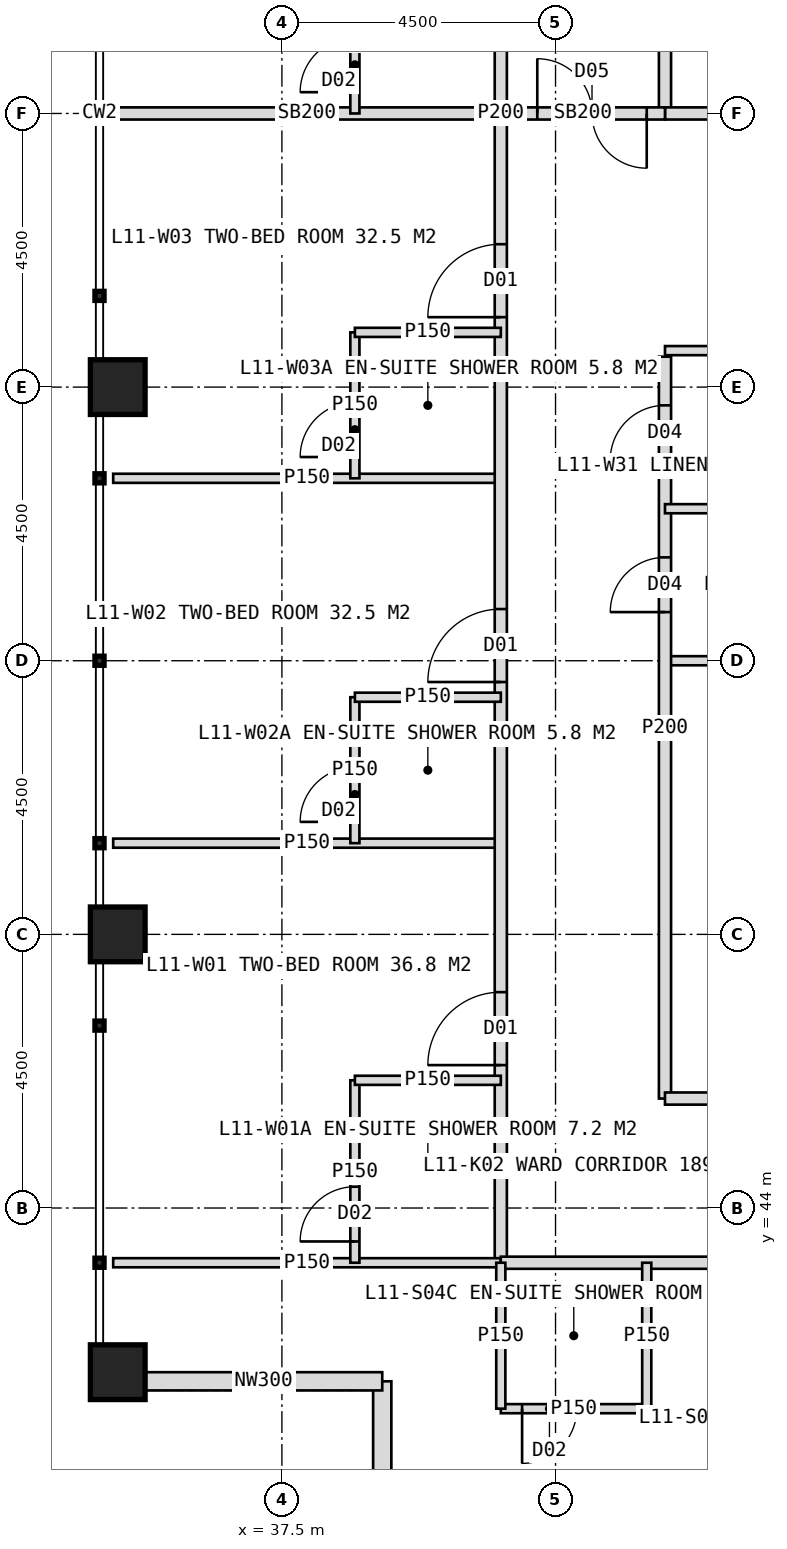
"""IFC4 building model, lengths in metres.
Left out: names, types, materials, properties, quantities, classifications, styles, units other than length and angle.
Written with IfcOpenShell. Run it as: python <this file> out.ifc"""

import sys

from ifc_helpers import new_model, si_unit, direction, frame, frame_2d, origin, origin_2d, place, context, subcontext, project, spatial, rectangle, hollow_rectangle, extrude, element, fill, save


model = new_model("IFC4")
c1 = context("Model", 3, precision=1e-05, world=origin(), true_north=direction((0.0, 1.0)))
c2 = subcontext(c1, "Body", "Model", "MODEL_VIEW")
j1 = project(units=[si_unit("LENGTHUNIT", "METRE"), si_unit("PLANEANGLEUNIT", "RADIAN")], contexts=[c1])
p1 = place(None, origin())
s1 = spatial("IfcSite", under=j1, at=p1, CompositionType="ELEMENT")
p2 = place(p1, origin())
s2 = spatial("IfcBuilding", under=s1, at=p2, CompositionType="ELEMENT")
p3 = place(p2, frame((0.0, 0.0, 51.0)))
s3 = spatial("IfcBuildingStorey", under=s2, at=p3, CompositionType="ELEMENT", Elevation=51.0)
for number, where, z_axis, x_axis in (
    (1, (34.8, 41.3, 0.0), (0.0, 0.0, 1.0), (1.0, 0.0, 0.0)),
    (2, (34.8, 48.5, 0.0), (0.0, 0.0, 1.0), (1.0, 0.0, 0.0)),
    (3, (34.8, 57.5, 0.0), (0.0, 0.0, 1.0), (1.0, 0.0, 0.0)),
):
    element("IfcColumn", number, at=place(p3, frame(where, z_axis=z_axis, x_axis=x_axis)), inside=s3, PredefinedType="COLUMN", context=c2, shape_type="SweptSolid", body=[
        extrude(hollow_rectangle(XDim=0.9, YDim=0.9, WallThickness=0.08, at=origin_2d()), origin(), (0.0, 0.0, 1.0), 4.0),
    ])
for number, where, z_axis, x_axis in (
    (4, (39.15, 37.25, 0.0), (0.0, 0.0, 1.0), (0.0, 1.0, 0.0)),
    (5, (39.15, 41.15, 0.0), (0.0, 0.0, 1.0), (-1.0, 0.0, 0.0)),
):
    element("IfcWall", number, at=place(p3, frame(where, z_axis=z_axis, x_axis=x_axis)), inside=s3, PredefinedType="ELEMENTEDWALL", context=c2, shape_type="SweptSolid", body=[
        extrude(rectangle(XDim=3.9, YDim=0.3, at=frame_2d((1.95, 0.0))), origin(), (0.0, 0.0, 1.0), 2.95),
    ])
for number, where, z_axis, x_axis in (
    (6, (41.1, 50.0, 0.0), (0.0, 0.0, 1.0), (-1.0, 0.0, 0.0)),
    (7, (41.1, 56.0, 0.0), (0.0, 0.0, 1.0), (-1.0, 0.0, 0.0)),
):
    element("IfcWall", number, at=place(p3, frame(where, z_axis=z_axis, x_axis=x_axis)), inside=s3, PredefinedType="PARTITIONING", context=c2, shape_type="SweptSolid", body=[
        extrude(rectangle(XDim=6.375, YDim=0.15, at=frame_2d((3.188, 0.0))), origin(), (0.0, 0.0, 1.0), 3.75),
    ])
p4 = place(p3, frame((41.1, 62.0, 0.0), z_axis=(0.0, 0.0, 1.0), x_axis=(-1.0, 0.0, 0.0)))
e8 = element("IfcWall", 8, at=p4, inside=s3, PredefinedType="SOLIDWALL", context=c2, shape_type="SweptSolid", body=[
    extrude(rectangle(XDim=6.375, YDim=0.2, at=frame_2d((3.188, 0.0))), origin(), (0.0, 0.0, 1.0), 2.75),
])
p5 = place(p3, frame((41.1, 43.1, 0.0), z_axis=(0.0, 0.0, 1.0), x_axis=(0.0, 1.0, 0.0)))
e9 = element("IfcWall", 9, at=p5, inside=s3, PredefinedType="PARTITIONING", context=c2, shape_type="SweptSolid", body=[
    extrude(rectangle(XDim=37.8, YDim=0.2, at=frame_2d((18.9, 0.0))), origin(), (0.0, 0.0, 1.0), 3.75),
])
p6 = place(p5, frame((3.25, 0.0, 0.0)))
e10 = element("IfcOpeningElement", 10, at=p6, cuts=e9, PredefinedType="OPENING", context=c2, shape_type="SweptSolid", body=[
    extrude(rectangle(XDim=1.2, YDim=2.2, at=frame_2d((0.6, 1.1))), frame((0.0, 0.11, 0.0), z_axis=(0.0, -1.0, 0.0), x_axis=(1.0, 0.0, 0.0)), (0.0, 0.0, 1.0), 0.22),
])
p7 = place(p5, frame((9.55, 0.0, 0.0)))
e11 = element("IfcOpeningElement", 11, at=p7, cuts=e9, PredefinedType="OPENING", context=c2, shape_type="SweptSolid", body=[
    extrude(rectangle(XDim=1.2, YDim=2.2, at=frame_2d((0.6, 1.1))), frame((0.0, 0.11, 0.0), z_axis=(0.0, -1.0, 0.0), x_axis=(1.0, 0.0, 0.0)), (0.0, 0.0, 1.0), 0.22),
])
p8 = place(p5, frame((15.55, 0.0, 0.0)))
e12 = element("IfcOpeningElement", 12, at=p8, cuts=e9, PredefinedType="OPENING", context=c2, shape_type="SweptSolid", body=[
    extrude(rectangle(XDim=1.2, YDim=2.2, at=frame_2d((0.6, 1.1))), frame((0.0, 0.11, 0.0), z_axis=(0.0, -1.0, 0.0), x_axis=(1.0, 0.0, 0.0)), (0.0, 0.0, 1.0), 0.22),
])
p9 = place(p5, frame((21.55, 0.0, 0.0)))
e13 = element("IfcOpeningElement", 13, at=p9, cuts=e9, PredefinedType="OPENING", context=c2, shape_type="SweptSolid", body=[
    extrude(rectangle(XDim=1.2, YDim=2.2, at=frame_2d((0.6, 1.1))), frame((0.0, 0.11, 0.0), z_axis=(0.0, -1.0, 0.0), x_axis=(1.0, 0.0, 0.0)), (0.0, 0.0, 1.0), 0.22),
])
p10 = place(p5, frame((27.55, 0.0, 0.0)))
e14 = element("IfcOpeningElement", 14, at=p10, cuts=e9, PredefinedType="OPENING", context=c2, shape_type="SweptSolid", body=[
    extrude(rectangle(XDim=1.2, YDim=2.2, at=frame_2d((0.6, 1.1))), frame((0.0, 0.11, 0.0), z_axis=(0.0, -1.0, 0.0), x_axis=(1.0, 0.0, 0.0)), (0.0, 0.0, 1.0), 0.22),
])
p11 = place(p3, frame((41.1, 43.1, 0.0), z_axis=(0.0, 0.0, 1.0), x_axis=(-1.0, 0.0, 0.0)))
e15 = element("IfcWall", 15, at=p11, inside=s3, PredefinedType="PARTITIONING", context=c2, shape_type="SweptSolid", body=[
    extrude(rectangle(XDim=6.375, YDim=0.15, at=frame_2d((3.188, 0.0))), origin(), (0.0, 0.0, 1.0), 3.75),
])
p12 = place(p3, frame((38.7, 43.1, 0.0), z_axis=(0.0, 0.0, 1.0), x_axis=(0.0, 1.0, 0.0)))
e16 = element("IfcWall", 16, at=p12, inside=s3, PredefinedType="PARTITIONING", context=c2, shape_type="SweptSolid", body=[
    extrude(rectangle(XDim=3.0, YDim=0.15, at=frame_2d((1.5, 0.0))), origin(), (0.0, 0.0, 1.0), 3.75),
])
p13 = place(p12, frame((0.35, 0.0, 0.0)))
e17 = element("IfcOpeningElement", 17, at=p13, cuts=e16, PredefinedType="OPENING", context=c2, shape_type="SweptSolid", body=[
    extrude(rectangle(XDim=0.9, YDim=2.1, at=frame_2d((0.45, 1.05))), frame((0.0, 0.085, 0.0), z_axis=(0.0, -1.0, 0.0), x_axis=(1.0, 0.0, 0.0)), (0.0, 0.0, 1.0), 0.17),
])
p14 = place(p3, frame((41.1, 46.1, 0.0), z_axis=(0.0, 0.0, 1.0), x_axis=(-1.0, 0.0, 0.0)))
e18 = element("IfcWall", 18, at=p14, inside=s3, PredefinedType="PARTITIONING", context=c2, shape_type="SweptSolid", body=[
    extrude(rectangle(XDim=2.4, YDim=0.15, at=frame_2d((1.2, 0.0))), origin(), (0.0, 0.0, 1.0), 3.75),
])
p15 = place(p3, frame((38.7, 50.0, 0.0), z_axis=(0.0, 0.0, 1.0), x_axis=(0.0, 1.0, 0.0)))
e19 = element("IfcWall", 19, at=p15, inside=s3, PredefinedType="PARTITIONING", context=c2, shape_type="SweptSolid", body=[
    extrude(rectangle(XDim=2.4, YDim=0.15, at=frame_2d((1.2, 0.0))), origin(), (0.0, 0.0, 1.0), 3.75),
])
p16 = place(p15, frame((0.35, 0.0, 0.0)))
e20 = element("IfcOpeningElement", 20, at=p16, cuts=e19, PredefinedType="OPENING", context=c2, shape_type="SweptSolid", body=[
    extrude(rectangle(XDim=0.9, YDim=2.1, at=frame_2d((0.45, 1.05))), frame((0.0, 0.085, 0.0), z_axis=(0.0, -1.0, 0.0), x_axis=(1.0, 0.0, 0.0)), (0.0, 0.0, 1.0), 0.17),
])
p17 = place(p3, frame((41.1, 52.4, 0.0), z_axis=(0.0, 0.0, 1.0), x_axis=(-1.0, 0.0, 0.0)))
e21 = element("IfcWall", 21, at=p17, inside=s3, PredefinedType="PARTITIONING", context=c2, shape_type="SweptSolid", body=[
    extrude(rectangle(XDim=2.4, YDim=0.15, at=frame_2d((1.2, 0.0))), origin(), (0.0, 0.0, 1.0), 3.75),
])
p18 = place(p3, frame((38.7, 56.0, 0.0), z_axis=(0.0, 0.0, 1.0), x_axis=(0.0, 1.0, 0.0)))
e22 = element("IfcWall", 22, at=p18, inside=s3, PredefinedType="PARTITIONING", context=c2, shape_type="SweptSolid", body=[
    extrude(rectangle(XDim=2.4, YDim=0.15, at=frame_2d((1.2, 0.0))), origin(), (0.0, 0.0, 1.0), 3.75),
])
p19 = place(p18, frame((0.35, 0.0, 0.0)))
e23 = element("IfcOpeningElement", 23, at=p19, cuts=e22, PredefinedType="OPENING", context=c2, shape_type="SweptSolid", body=[
    extrude(rectangle(XDim=0.9, YDim=2.1, at=frame_2d((0.45, 1.05))), frame((0.0, 0.085, 0.0), z_axis=(0.0, -1.0, 0.0), x_axis=(1.0, 0.0, 0.0)), (0.0, 0.0, 1.0), 0.17),
])
p20 = place(p3, frame((41.1, 58.4, 0.0), z_axis=(0.0, 0.0, 1.0), x_axis=(-1.0, 0.0, 0.0)))
e24 = element("IfcWall", 24, at=p20, inside=s3, PredefinedType="PARTITIONING", context=c2, shape_type="SweptSolid", body=[
    extrude(rectangle(XDim=2.4, YDim=0.15, at=frame_2d((1.2, 0.0))), origin(), (0.0, 0.0, 1.0), 3.75),
])
p21 = place(p3, frame((38.7, 62.0, 0.0), z_axis=(0.0, 0.0, 1.0), x_axis=(0.0, 1.0, 0.0)))
e25 = element("IfcWall", 25, at=p21, inside=s3, PredefinedType="PARTITIONING", context=c2, shape_type="SweptSolid", body=[
    extrude(rectangle(XDim=2.4, YDim=0.15, at=frame_2d((1.2, 0.0))), origin(), (0.0, 0.0, 1.0), 3.75),
])
p22 = place(p21, frame((0.35, 0.0, 0.0)))
e26 = element("IfcOpeningElement", 26, at=p22, cuts=e25, PredefinedType="OPENING", context=c2, shape_type="SweptSolid", body=[
    extrude(rectangle(XDim=0.9, YDim=2.1, at=frame_2d((0.45, 1.05))), frame((0.0, 0.085, 0.0), z_axis=(0.0, -1.0, 0.0), x_axis=(1.0, 0.0, 0.0)), (0.0, 0.0, 1.0), 0.17),
])
p23 = place(p3, frame((51.0, 53.0, 0.0), z_axis=(0.0, 0.0, 1.0), x_axis=(-1.0, 0.0, 0.0)))
e27 = element("IfcWall", 27, at=p23, inside=s3, PredefinedType="PARTITIONING", context=c2, shape_type="SweptSolid", body=[
    extrude(rectangle(XDim=7.2, YDim=0.15, at=frame_2d((3.6, 0.0))), origin(), (0.0, 0.0, 1.0), 3.75),
])
p24 = place(p3, frame((43.8, 45.8, 0.0), z_axis=(0.0, 0.0, 1.0), x_axis=(0.0, 1.0, 0.0)))
e28 = element("IfcWall", 28, at=p24, inside=s3, PredefinedType="PARTITIONING", context=c2, shape_type="SweptSolid", body=[
    extrude(rectangle(XDim=12.2, YDim=0.2, at=frame_2d((6.1, 0.0))), origin(), (0.0, 0.0, 1.0), 3.75),
])
p25 = place(p24, frame((8.0, 0.0, 0.0)))
e29 = element("IfcOpeningElement", 29, at=p25, cuts=e28, PredefinedType="OPENING", context=c2, shape_type="SweptSolid", body=[
    extrude(rectangle(XDim=0.9, YDim=2.1, at=frame_2d((0.45, 1.05))), frame((0.0, 0.11, 0.0), z_axis=(0.0, -1.0, 0.0), x_axis=(1.0, 0.0, 0.0)), (0.0, 0.0, 1.0), 0.22),
])
p26 = place(p24, frame((10.5, 0.0, 0.0)))
e30 = element("IfcOpeningElement", 30, at=p26, cuts=e28, PredefinedType="OPENING", context=c2, shape_type="SweptSolid", body=[
    extrude(rectangle(XDim=0.9, YDim=2.1, at=frame_2d((0.45, 1.05))), frame((0.0, 0.11, 0.0), z_axis=(0.0, -1.0, 0.0), x_axis=(1.0, 0.0, 0.0)), (0.0, 0.0, 1.0), 0.22),
])
p27 = place(p3, frame((43.8, 62.0, 0.0), z_axis=(0.0, 0.0, 1.0), x_axis=(0.0, 1.0, 0.0)))
e31 = element("IfcWall", 31, at=p27, inside=s3, PredefinedType="PARTITIONING", context=c2, shape_type="SweptSolid", body=[
    extrude(rectangle(XDim=16.2, YDim=0.2, at=frame_2d((8.1, 0.0))), origin(), (0.0, 0.0, 1.0), 3.75),
])
p28 = place(p27, frame((4.0, 0.0, 0.0)))
e32 = element("IfcOpeningElement", 32, at=p28, cuts=e31, PredefinedType="OPENING", context=c2, shape_type="SweptSolid", body=[
    extrude(rectangle(XDim=1.0, YDim=2.1, at=frame_2d((0.5, 1.05))), frame((0.0, 0.11, 0.0), z_axis=(0.0, -1.0, 0.0), x_axis=(1.0, 0.0, 0.0)), (0.0, 0.0, 1.0), 0.22),
])
p29 = place(p27, frame((12.1, 0.0, 0.0)))
e33 = element("IfcOpeningElement", 33, at=p29, cuts=e31, PredefinedType="OPENING", context=c2, shape_type="SweptSolid", body=[
    extrude(rectangle(XDim=1.0, YDim=2.1, at=frame_2d((0.5, 1.05))), frame((0.0, 0.11, 0.0), z_axis=(0.0, -1.0, 0.0), x_axis=(1.0, 0.0, 0.0)), (0.0, 0.0, 1.0), 0.22),
])
p30 = place(p3, frame((51.0, 58.1, 0.0), z_axis=(0.0, 0.0, 1.0), x_axis=(-1.0, 0.0, 0.0)))
e34 = element("IfcWall", 34, at=p30, inside=s3, PredefinedType="PARTITIONING", context=c2, shape_type="SweptSolid", body=[
    extrude(rectangle(XDim=7.2, YDim=0.15, at=frame_2d((3.6, 0.0))), origin(), (0.0, 0.0, 1.0), 3.75),
])
p31 = place(p30, frame((0.6, 0.0, 0.0)))
e35 = element("IfcOpeningElement", 35, at=p31, cuts=e34, PredefinedType="OPENING", context=c2, shape_type="SweptSolid", body=[
    extrude(rectangle(XDim=0.9, YDim=2.1, at=frame_2d((0.45, 1.05))), frame((0.0, 0.085, 0.0), z_axis=(0.0, -1.0, 0.0), x_axis=(1.0, 0.0, 0.0)), (0.0, 0.0, 1.0), 0.17),
])
p32 = place(p3, frame((51.0, 62.0, 0.0), z_axis=(0.0, 0.0, 1.0), x_axis=(-1.0, 0.0, 0.0)))
e36 = element("IfcWall", 36, at=p32, inside=s3, PredefinedType="SOLIDWALL", context=c2, shape_type="SweptSolid", body=[
    extrude(rectangle(XDim=7.2, YDim=0.2, at=frame_2d((3.6, 0.0))), origin(), (0.0, 0.0, 1.0), 2.75),
])
p33 = place(p3, frame((51.0, 55.5, 0.0), z_axis=(0.0, 0.0, 1.0), x_axis=(-1.0, 0.0, 0.0)))
e37 = element("IfcWall", 37, at=p33, inside=s3, PredefinedType="PARTITIONING", context=c2, shape_type="SweptSolid", body=[
    extrude(rectangle(XDim=7.2, YDim=0.15, at=frame_2d((3.6, 0.0))), origin(), (0.0, 0.0, 1.0), 3.75),
])
p34 = place(p3, frame((78.9, 43.1, 0.0), z_axis=(0.0, 0.0, 1.0), x_axis=(-1.0, 0.0, 0.0)))
e38 = element("IfcWall", 38, at=p34, inside=s3, PredefinedType="PARTITIONING", context=c2, shape_type="SweptSolid", body=[
    extrude(rectangle(XDim=37.8, YDim=0.2, at=frame_2d((18.9, 0.0))), origin(), (0.0, 0.0, 1.0), 3.75),
])
p35 = place(p34, frame((2.65, 0.0, 0.0)))
e39 = element("IfcOpeningElement", 39, at=p35, cuts=e38, PredefinedType="OPENING", context=c2, shape_type="SweptSolid", body=[
    extrude(rectangle(XDim=1.2, YDim=2.2, at=frame_2d((0.6, 1.1))), frame((0.0, 0.11, 0.0), z_axis=(0.0, -1.0, 0.0), x_axis=(1.0, 0.0, 0.0)), (0.0, 0.0, 1.0), 0.22),
])
p36 = place(p34, frame((12.55, 0.0, 0.0)))
e40 = element("IfcOpeningElement", 40, at=p36, cuts=e38, PredefinedType="OPENING", context=c2, shape_type="SweptSolid", body=[
    extrude(rectangle(XDim=1.2, YDim=2.2, at=frame_2d((0.6, 1.1))), frame((0.0, 0.11, 0.0), z_axis=(0.0, -1.0, 0.0), x_axis=(1.0, 0.0, 0.0)), (0.0, 0.0, 1.0), 0.22),
])
p37 = place(p34, frame((21.55, 0.0, 0.0)))
e41 = element("IfcOpeningElement", 41, at=p37, cuts=e38, PredefinedType="OPENING", context=c2, shape_type="SweptSolid", body=[
    extrude(rectangle(XDim=1.2, YDim=2.2, at=frame_2d((0.6, 1.1))), frame((0.0, 0.11, 0.0), z_axis=(0.0, -1.0, 0.0), x_axis=(1.0, 0.0, 0.0)), (0.0, 0.0, 1.0), 0.22),
])
p38 = place(p34, frame((30.55, 0.0, 0.0)))
e42 = element("IfcOpeningElement", 42, at=p38, cuts=e38, PredefinedType="OPENING", context=c2, shape_type="SweptSolid", body=[
    extrude(rectangle(XDim=1.2, YDim=2.2, at=frame_2d((0.6, 1.1))), frame((0.0, 0.11, 0.0), z_axis=(0.0, -1.0, 0.0), x_axis=(1.0, 0.0, 0.0)), (0.0, 0.0, 1.0), 0.22),
])
p39 = place(p3, frame((43.5, 40.7, 0.0), z_axis=(0.0, 0.0, 1.0), x_axis=(-1.0, 0.0, 0.0)))
e43 = element("IfcWall", 43, at=p39, inside=s3, PredefinedType="PARTITIONING", context=c2, shape_type="SweptSolid", body=[
    extrude(rectangle(XDim=2.4, YDim=0.15, at=frame_2d((1.2, 0.0))), origin(), (0.0, 0.0, 1.0), 3.75),
])
p40 = place(p39, frame((1.15, 0.0, 0.0)))
e44 = element("IfcOpeningElement", 44, at=p40, cuts=e43, PredefinedType="OPENING", context=c2, shape_type="SweptSolid", body=[
    extrude(rectangle(XDim=0.9, YDim=2.1, at=frame_2d((0.45, 1.05))), frame((0.0, 0.085, 0.0), z_axis=(0.0, -1.0, 0.0), x_axis=(1.0, 0.0, 0.0)), (0.0, 0.0, 1.0), 0.17),
])
for number, where, z_axis, x_axis in (
    (45, (43.5, 43.1, 0.0), (0.0, 0.0, 1.0), (0.0, -1.0, 0.0)),
    (46, (41.1, 43.1, 0.0), (0.0, 0.0, 1.0), (0.0, -1.0, 0.0)),
):
    element("IfcWall", number, at=place(p3, frame(where, z_axis=z_axis, x_axis=x_axis)), inside=s3, PredefinedType="PARTITIONING", context=c2, shape_type="SweptSolid", body=[
        extrude(rectangle(XDim=2.4, YDim=0.15, at=frame_2d((1.2, 0.0))), origin(), (0.0, 0.0, 1.0), 3.75),
    ])
p41 = place(p3, frame((57.75, 45.8, 0.0), z_axis=(0.0, 0.0, 1.0), x_axis=(-1.0, 0.0, 0.0)))
e47 = element("IfcWall", 47, at=p41, inside=s3, PredefinedType="PARTITIONING", context=c2, shape_type="SweptSolid", body=[
    extrude(rectangle(XDim=13.95, YDim=0.2, at=frame_2d((6.975, 0.0))), origin(), (0.0, 0.0, 1.0), 3.75),
])
p42 = place(p41, frame((1.375, 0.0, 0.0)))
e48 = element("IfcOpeningElement", 48, at=p42, cuts=e47, PredefinedType="OPENING", context=c2, shape_type="SweptSolid", body=[
    extrude(rectangle(XDim=1.0, YDim=2.1, at=frame_2d((0.5, 1.05))), frame((0.0, 0.11, 0.0), z_axis=(0.0, -1.0, 0.0), x_axis=(1.0, 0.0, 0.0)), (0.0, 0.0, 1.0), 0.22),
])
p43 = place(p41, frame((5.5, 0.0, 0.0)))
e49 = element("IfcOpeningElement", 49, at=p43, cuts=e47, PredefinedType="OPENING", context=c2, shape_type="SweptSolid", body=[
    extrude(rectangle(XDim=1.0, YDim=2.1, at=frame_2d((0.5, 1.05))), frame((0.0, 0.11, 0.0), z_axis=(0.0, -1.0, 0.0), x_axis=(1.0, 0.0, 0.0)), (0.0, 0.0, 1.0), 0.22),
])
p44 = place(p41, frame((10.6, 0.0, 0.0)))
e50 = element("IfcOpeningElement", 50, at=p44, cuts=e47, PredefinedType="OPENING", context=c2, shape_type="SweptSolid", body=[
    extrude(rectangle(XDim=1.0, YDim=2.1, at=frame_2d((0.5, 1.05))), frame((0.0, 0.11, 0.0), z_axis=(0.0, -1.0, 0.0), x_axis=(1.0, 0.0, 0.0)), (0.0, 0.0, 1.0), 0.22),
])
p45 = place(p3, frame((43.8, 62.0, 0.0), z_axis=(0.0, 0.0, 1.0), x_axis=(-1.0, 0.0, 0.0)))
e51 = element("IfcWall", 51, at=p45, inside=s3, PredefinedType="SOLIDWALL", context=c2, shape_type="SweptSolid", body=[
    extrude(rectangle(XDim=2.7, YDim=0.2, at=frame_2d((1.35, 0.0))), origin(), (0.0, 0.0, 1.0), 2.75),
])
p46 = place(p45, frame((0.3, 0.0, 0.0)))
e52 = element("IfcOpeningElement", 52, at=p46, cuts=e51, PredefinedType="OPENING", context=c2, shape_type="SweptSolid", body=[
    extrude(rectangle(XDim=1.8, YDim=2.2, at=frame_2d((0.9, 1.1))), frame((0.0, 0.11, 0.0), z_axis=(0.0, -1.0, 0.0), x_axis=(1.0, 0.0, 0.0)), (0.0, 0.0, 1.0), 0.22),
])
p47 = place(p6, origin())
e53 = element("IfcDoor", 53, at=p47, inside=s3, OperationType="SINGLE_SWING_LEFT", PredefinedType="DOOR", context=c2, shape_type="SweptSolid", body=[
    extrude(rectangle(XDim=1.2, YDim=2.2, at=frame_2d((0.6, 1.1))), frame((0.0, 0.025, 0.0), z_axis=(0.0, -1.0, 0.0), x_axis=(1.0, 0.0, 0.0)), (0.0, 0.0, 1.0), 0.05),
])
fill(e10, e53)
p48 = place(p13, origin())
e54 = element("IfcDoor", 54, at=p48, inside=s3, OperationType="SINGLE_SWING_LEFT", PredefinedType="DOOR", context=c2, shape_type="SweptSolid", body=[
    extrude(rectangle(XDim=0.9, YDim=2.1, at=frame_2d((0.45, 1.05))), frame((0.0, 0.025, 0.0), z_axis=(0.0, -1.0, 0.0), x_axis=(1.0, 0.0, 0.0)), (0.0, 0.0, 1.0), 0.05),
])
fill(e17, e54)
p49 = place(p7, origin())
e55 = element("IfcDoor", 55, at=p49, inside=s3, OperationType="SINGLE_SWING_LEFT", PredefinedType="DOOR", context=c2, shape_type="SweptSolid", body=[
    extrude(rectangle(XDim=1.2, YDim=2.2, at=frame_2d((0.6, 1.1))), frame((0.0, 0.025, 0.0), z_axis=(0.0, -1.0, 0.0), x_axis=(1.0, 0.0, 0.0)), (0.0, 0.0, 1.0), 0.05),
])
fill(e11, e55)
p50 = place(p16, origin())
e56 = element("IfcDoor", 56, at=p50, inside=s3, OperationType="SINGLE_SWING_LEFT", PredefinedType="DOOR", context=c2, shape_type="SweptSolid", body=[
    extrude(rectangle(XDim=0.9, YDim=2.1, at=frame_2d((0.45, 1.05))), frame((0.0, 0.025, 0.0), z_axis=(0.0, -1.0, 0.0), x_axis=(1.0, 0.0, 0.0)), (0.0, 0.0, 1.0), 0.05),
])
fill(e20, e56)
p51 = place(p8, origin())
e57 = element("IfcDoor", 57, at=p51, inside=s3, OperationType="SINGLE_SWING_LEFT", PredefinedType="DOOR", context=c2, shape_type="SweptSolid", body=[
    extrude(rectangle(XDim=1.2, YDim=2.2, at=frame_2d((0.6, 1.1))), frame((0.0, 0.025, 0.0), z_axis=(0.0, -1.0, 0.0), x_axis=(1.0, 0.0, 0.0)), (0.0, 0.0, 1.0), 0.05),
])
fill(e12, e57)
p52 = place(p19, origin())
e58 = element("IfcDoor", 58, at=p52, inside=s3, OperationType="SINGLE_SWING_LEFT", PredefinedType="DOOR", context=c2, shape_type="SweptSolid", body=[
    extrude(rectangle(XDim=0.9, YDim=2.1, at=frame_2d((0.45, 1.05))), frame((0.0, 0.025, 0.0), z_axis=(0.0, -1.0, 0.0), x_axis=(1.0, 0.0, 0.0)), (0.0, 0.0, 1.0), 0.05),
])
fill(e23, e58)
p53 = place(p22, origin())
e59 = element("IfcDoor", 59, at=p53, inside=s3, OperationType="SINGLE_SWING_LEFT", PredefinedType="DOOR", context=c2, shape_type="SweptSolid", body=[
    extrude(rectangle(XDim=0.9, YDim=2.1, at=frame_2d((0.45, 1.05))), frame((0.0, 0.025, 0.0), z_axis=(0.0, -1.0, 0.0), x_axis=(1.0, 0.0, 0.0)), (0.0, 0.0, 1.0), 0.05),
])
fill(e26, e59)
p54 = place(p25, origin())
e60 = element("IfcDoor", 60, at=p54, inside=s3, OperationType="SINGLE_SWING_LEFT", PredefinedType="DOOR", context=c2, shape_type="SweptSolid", body=[
    extrude(rectangle(XDim=0.9, YDim=2.1, at=frame_2d((0.45, 1.05))), frame((0.0, 0.025, 0.0), z_axis=(0.0, -1.0, 0.0), x_axis=(1.0, 0.0, 0.0)), (0.0, 0.0, 1.0), 0.05),
])
fill(e29, e60)
p55 = place(p26, origin())
e61 = element("IfcDoor", 61, at=p55, inside=s3, OperationType="SINGLE_SWING_LEFT", PredefinedType="DOOR", context=c2, shape_type="SweptSolid", body=[
    extrude(rectangle(XDim=0.9, YDim=2.1, at=frame_2d((0.45, 1.05))), frame((0.0, 0.025, 0.0), z_axis=(0.0, -1.0, 0.0), x_axis=(1.0, 0.0, 0.0)), (0.0, 0.0, 1.0), 0.05),
])
fill(e30, e61)
p56 = place(p40, origin())
e62 = element("IfcDoor", 62, at=p56, inside=s3, OperationType="SINGLE_SWING_RIGHT", PredefinedType="DOOR", context=c2, shape_type="SweptSolid", body=[
    extrude(rectangle(XDim=0.9, YDim=2.1, at=frame_2d((0.45, 1.05))), frame((0.0, 0.025, 0.0), z_axis=(0.0, -1.0, 0.0), x_axis=(1.0, 0.0, 0.0)), (0.0, 0.0, 1.0), 0.05),
])
fill(e44, e62)
p57 = place(p46, origin())
e63 = element("IfcDoor", 63, at=p57, inside=s3, OperationType="DOUBLE_DOOR_DOUBLE_SWING", PredefinedType="DOOR", context=c2, shape_type="SweptSolid", body=[
    extrude(rectangle(XDim=1.8, YDim=2.2, at=frame_2d((0.9, 1.1))), frame((0.0, 0.025, 0.0), z_axis=(0.0, -1.0, 0.0), x_axis=(1.0, 0.0, 0.0)), (0.0, 0.0, 1.0), 0.05),
])
fill(e52, e63)
save(model, sys.argv[1])
